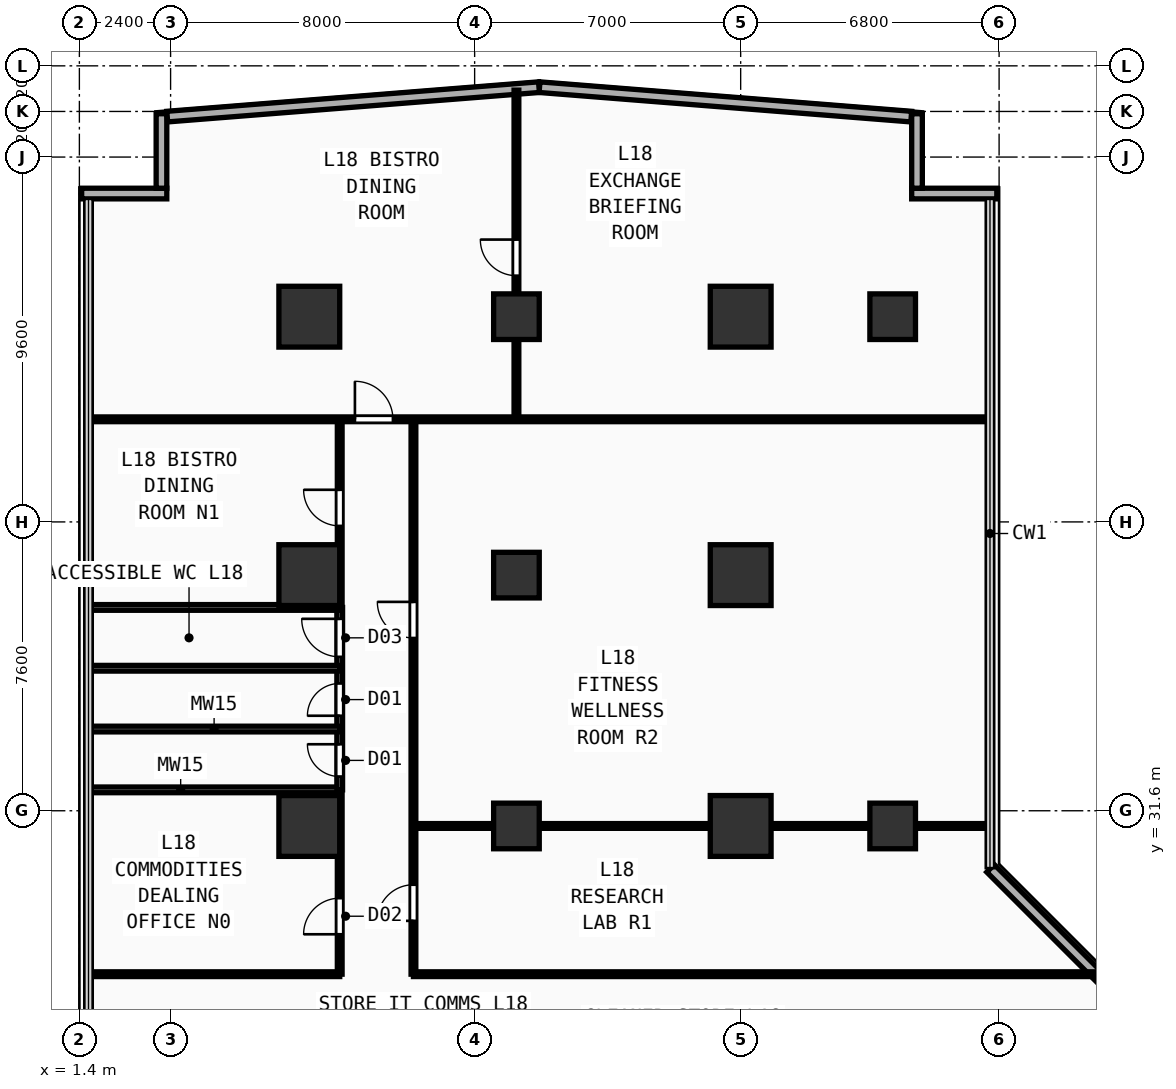
"""IFC4 building model, lengths in metres.
Left out: names, types, materials, properties, quantities, classifications, styles, units other than length and angle.
Written with IfcOpenShell. Run it as: python <this file> out.ifc"""

import sys

from ifc_helpers import new_model, si_unit, direction, frame, frame_2d, origin, origin_2d, place, context, subcontext, project, spatial, rectangle, extrude, element, fill, save


model = new_model("IFC4")
c1 = context("Model", 3, precision=1e-05, world=origin(), true_north=direction((0.0, 1.0)))
c2 = subcontext(c1, "Body", "Model", "MODEL_VIEW")
j1 = project(units=[si_unit("LENGTHUNIT", "METRE"), si_unit("PLANEANGLEUNIT", "RADIAN")], contexts=[c1])
p1 = place(None, origin())
s1 = spatial("IfcSite", under=j1, at=p1, CompositionType="ELEMENT")
p2 = place(p1, origin())
s2 = spatial("IfcBuilding", under=s1, at=p2, CompositionType="ELEMENT")
p3 = place(p2, frame((0.0, 0.0, 71.4)))
s3 = spatial("IfcBuildingStorey", under=s2, at=p3, CompositionType="ELEMENT", Elevation=71.4)
for number, where, z_axis, x_axis in (
    (1, (7.45, 31.2, 0.0), (0.0, 0.0, 1.0), (1.0, 0.0, 0.0)),
    (2, (7.45, 37.8, 0.0), (0.0, 0.0, 1.0), (1.0, 0.0, 0.0)),
    (3, (7.45, 44.6, 0.0), (0.0, 0.0, 1.0), (1.0, 0.0, 0.0)),
    (4, (18.8, 31.2, 0.0), (0.0, 0.0, 1.0), (1.0, 0.0, 0.0)),
    (5, (18.8, 37.8, 0.0), (0.0, 0.0, 1.0), (1.0, 0.0, 0.0)),
    (6, (18.8, 44.6, 0.0), (0.0, 0.0, 1.0), (1.0, 0.0, 0.0)),
):
    element("IfcColumn", number, at=place(p3, frame(where, z_axis=z_axis, x_axis=x_axis)), inside=s3, PredefinedType="COLUMN", context=c2, shape_type="SweptSolid", body=[
        extrude(rectangle(XDim=1.6, YDim=1.6, at=origin_2d()), origin(), (0.0, 0.0, 1.0), 3.54),
    ])
for number, where, z_axis, x_axis in (
    (7, (22.8, 31.2, 0.0), (0.0, 0.0, 1.0), (1.0, 0.0, 0.0)),
    (8, (22.8, 44.6, 0.0), (0.0, 0.0, 1.0), (1.0, 0.0, 0.0)),
    (9, (12.9, 31.2, 0.0), (0.0, 0.0, 1.0), (1.0, 0.0, 0.0)),
    (10, (12.9, 37.8, 0.0), (0.0, 0.0, 1.0), (1.0, 0.0, 0.0)),
    (11, (12.9, 44.6, 0.0), (0.0, 0.0, 1.0), (1.0, 0.0, 0.0)),
):
    element("IfcColumn", number, at=place(p3, frame(where, z_axis=z_axis, x_axis=x_axis)), inside=s3, PredefinedType="COLUMN", context=c2, shape_type="SweptSolid", body=[
        extrude(rectangle(XDim=1.2, YDim=1.2, at=origin_2d()), origin(), (0.0, 0.0, 1.0), 3.54),
    ])
p4 = place(p3, frame((23.3, 47.84, 0.0), z_axis=(0.0, 0.0, 1.0), x_axis=(1.0, 0.0, 0.0)))
e12 = element("IfcWall", 12, at=p4, inside=s3, PredefinedType="SOLIDWALL", context=c2, shape_type="SweptSolid", body=[
    extrude(rectangle(XDim=2.24, YDim=0.28, at=frame_2d((1.12, 0.0))), origin(), (0.0, 0.0, 1.0), 3.54),
])
p5 = place(p3, frame((23.44, 47.98, 0.0), z_axis=(0.0, 0.0, 1.0), x_axis=(0.0, 1.0, 0.0)))
e13 = element("IfcWall", 13, at=p5, inside=s3, PredefinedType="SOLIDWALL", context=c2, shape_type="SweptSolid", body=[
    extrude(rectangle(XDim=1.96, YDim=0.28, at=frame_2d((0.98, 0.0))), origin(), (0.0, 0.0, 1.0), 3.54),
])
p6 = place(p3, frame((1.46, 47.84, 0.0), z_axis=(0.0, 0.0, 1.0), x_axis=(1.0, 0.0, 0.0)))
e14 = element("IfcWall", 14, at=p6, inside=s3, PredefinedType="SOLIDWALL", context=c2, shape_type="SweptSolid", body=[
    extrude(rectangle(XDim=2.24, YDim=0.28, at=frame_2d((1.12, 0.0))), origin(), (0.0, 0.0, 1.0), 3.54),
])
p7 = place(p3, frame((3.56, 47.98, 0.0), z_axis=(0.0, 0.0, 1.0), x_axis=(0.0, 1.0, 0.0)))
e15 = element("IfcWall", 15, at=p7, inside=s3, PredefinedType="SOLIDWALL", context=c2, shape_type="SweptSolid", body=[
    extrude(rectangle(XDim=1.96, YDim=0.28, at=frame_2d((0.98, 0.0))), origin(), (0.0, 0.0, 1.0), 3.54),
])
p8 = place(p3, frame((31.885, 23.575, 0.0), z_axis=(0.0, 0.0, 1.0), x_axis=(-0.707106781187, 0.707106781187, 0.0)))
e16 = element("IfcWall", 16, at=p8, inside=s3, PredefinedType="SOLIDWALL", context=c2, shape_type="SweptSolid", body=[
    extrude(rectangle(XDim=9.207, YDim=0.28, at=frame_2d((4.603, 0.0))), origin(), (0.0, 0.0, 1.0), 3.54),
])
for number, where, z_axis, x_axis in (
    (17, (23.288, 49.864, 0.0), (0.0, 0.0, 1.0), (-0.997, 0.079, 0.0)),
    (18, (13.493, 50.639, 0.0), (0.0, 0.0, 1.0), (-0.997, -0.079, 0.0)),
):
    element("IfcWall", number, at=place(p3, frame(where, z_axis=z_axis, x_axis=x_axis)), inside=s3, PredefinedType="SOLIDWALL", context=c2, shape_type="SweptSolid", body=[
        extrude(rectangle(XDim=9.812, YDim=0.28, at=frame_2d((4.906, 0.0))), origin(), (0.0, 0.0, 1.0), 3.54),
    ])
p9 = place(p3, frame((8.25, 27.3, 0.0), z_axis=(0.0, 0.0, 1.0), x_axis=(0.0, 1.0, 0.0)))
e19 = element("IfcWall", 19, at=p9, inside=s3, PredefinedType="PARTITIONING", context=c2, shape_type="SweptSolid", body=[
    extrude(rectangle(XDim=4.85, YDim=0.125, at=frame_2d((2.425, 0.0))), origin(), (0.0, 0.0, 1.0), 3.54),
])
p10 = place(p9, frame((1.05, 0.0, 0.0)))
e20 = element("IfcOpeningElement", 20, at=p10, cuts=e19, PredefinedType="OPENING", context=c2, shape_type="SweptSolid", body=[
    extrude(rectangle(XDim=0.95, YDim=2.15, at=frame_2d((0.475, 1.075))), frame((0.0, 0.073, 0.0), z_axis=(0.0, -1.0, 0.0), x_axis=(1.0, 0.0, 0.0)), (0.0, 0.0, 1.0), 0.145),
])
p11 = place(p3, frame((1.64, 27.3, 0.0), z_axis=(0.0, 0.0, 1.0), x_axis=(1.0, 0.0, 0.0)))
e21 = element("IfcWall", 21, at=p11, inside=s3, PredefinedType="PARTITIONING", context=c2, shape_type="SweptSolid", body=[
    extrude(rectangle(XDim=6.61, YDim=0.125, at=frame_2d((3.305, 0.0))), origin(), (0.0, 0.0, 1.0), 3.54),
])
p12 = place(p3, frame((1.64, 32.15, 0.0), z_axis=(0.0, 0.0, 1.0), x_axis=(1.0, 0.0, 0.0)))
e22 = element("IfcWall", 22, at=p12, inside=s3, PredefinedType="PLUMBINGWALL", context=c2, shape_type="SweptSolid", body=[
    extrude(rectangle(XDim=6.61, YDim=0.15, at=frame_2d((3.305, 0.0))), origin(), (0.0, 0.0, 1.0), 3.54),
])
p13 = place(p3, frame((8.25, 32.15, 0.0), z_axis=(0.0, 0.0, 1.0), x_axis=(0.0, 1.0, 0.0)))
e23 = element("IfcWall", 23, at=p13, inside=s3, PredefinedType="PLUMBINGWALL", context=c2, shape_type="SweptSolid", body=[
    extrude(rectangle(XDim=4.8, YDim=0.15, at=frame_2d((2.4, 0.0))), origin(), (0.0, 0.0, 1.0), 3.54),
])
p14 = place(p13, frame((0.35, 0.0, 0.0)))
e24 = element("IfcOpeningElement", 24, at=p14, cuts=e23, PredefinedType="OPENING", context=c2, shape_type="SweptSolid", body=[
    extrude(rectangle(XDim=0.85, YDim=2.15, at=frame_2d((0.425, 1.075))), frame((0.0, 0.085, 0.0), z_axis=(0.0, -1.0, 0.0), x_axis=(1.0, 0.0, 0.0)), (0.0, 0.0, 1.0), 0.17),
])
p15 = place(p13, frame((1.95, 0.0, 0.0)))
e25 = element("IfcOpeningElement", 25, at=p15, cuts=e23, PredefinedType="OPENING", context=c2, shape_type="SweptSolid", body=[
    extrude(rectangle(XDim=0.85, YDim=2.15, at=frame_2d((0.425, 1.075))), frame((0.0, 0.085, 0.0), z_axis=(0.0, -1.0, 0.0), x_axis=(1.0, 0.0, 0.0)), (0.0, 0.0, 1.0), 0.17),
])
p16 = place(p13, frame((3.5, 0.0, 0.0)))
e26 = element("IfcOpeningElement", 26, at=p16, cuts=e23, PredefinedType="OPENING", context=c2, shape_type="SweptSolid", body=[
    extrude(rectangle(XDim=1.0, YDim=2.2, at=frame_2d((0.5, 1.1))), frame((0.0, 0.085, 0.0), z_axis=(0.0, -1.0, 0.0), x_axis=(1.0, 0.0, 0.0)), (0.0, 0.0, 1.0), 0.17),
])
for number, where, z_axis, x_axis in (
    (27, (1.64, 33.75, 0.0), (0.0, 0.0, 1.0), (1.0, 0.0, 0.0)),
    (28, (1.64, 35.35, 0.0), (0.0, 0.0, 1.0), (1.0, 0.0, 0.0)),
):
    element("IfcWall", number, at=place(p3, frame(where, z_axis=z_axis, x_axis=x_axis)), inside=s3, PredefinedType="PLUMBINGWALL", context=c2, shape_type="SweptSolid", body=[
        extrude(rectangle(XDim=6.61, YDim=0.15, at=frame_2d((3.305, 0.0))), origin(), (0.0, 0.0, 1.0), 3.04),
    ])
p17 = place(p3, frame((1.64, 36.95, 0.0), z_axis=(0.0, 0.0, 1.0), x_axis=(1.0, 0.0, 0.0)))
e29 = element("IfcWall", 29, at=p17, inside=s3, PredefinedType="PLUMBINGWALL", context=c2, shape_type="SweptSolid", body=[
    extrude(rectangle(XDim=6.61, YDim=0.15, at=frame_2d((3.305, 0.0))), origin(), (0.0, 0.0, 1.0), 3.54),
])
p18 = place(p3, frame((8.25, 36.95, 0.0), z_axis=(0.0, 0.0, 1.0), x_axis=(0.0, 1.0, 0.0)))
e30 = element("IfcWall", 30, at=p18, inside=s3, PredefinedType="PARTITIONING", context=c2, shape_type="SweptSolid", body=[
    extrude(rectangle(XDim=4.95, YDim=0.125, at=frame_2d((2.475, 0.0))), origin(), (0.0, 0.0, 1.0), 3.54),
])
p19 = place(p18, frame((2.146, 0.0, 0.0)))
e31 = element("IfcOpeningElement", 31, at=p19, cuts=e30, PredefinedType="OPENING", context=c2, shape_type="SweptSolid", body=[
    extrude(rectangle(XDim=0.95, YDim=2.15, at=frame_2d((0.475, 1.075))), frame((0.0, 0.073, 0.0), z_axis=(0.0, -1.0, 0.0), x_axis=(1.0, 0.0, 0.0)), (0.0, 0.0, 1.0), 0.145),
])
p20 = place(p3, frame((1.64, 41.9, 0.0), z_axis=(0.0, 0.0, 1.0), x_axis=(1.0, 0.0, 0.0)))
e32 = element("IfcWall", 32, at=p20, inside=s3, PredefinedType="PARTITIONING", context=c2, shape_type="SweptSolid", body=[
    extrude(rectangle(XDim=23.72, YDim=0.125, at=frame_2d((11.86, 0.0))), origin(), (0.0, 0.0, 1.0), 3.54),
])
p21 = place(p20, frame((7.01, 0.0, 0.0)))
e33 = element("IfcOpeningElement", 33, at=p21, cuts=e32, PredefinedType="OPENING", context=c2, shape_type="SweptSolid", body=[
    extrude(rectangle(XDim=1.0, YDim=2.2, at=frame_2d((0.5, 1.1))), frame((0.0, 0.073, 0.0), z_axis=(0.0, -1.0, 0.0), x_axis=(1.0, 0.0, 0.0)), (0.0, 0.0, 1.0), 0.145),
])
p22 = place(p3, frame((12.9, 41.9, 0.0), z_axis=(0.0, 0.0, 1.0), x_axis=(0.0, 1.0, 0.0)))
e34 = element("IfcWall", 34, at=p22, inside=s3, PredefinedType="PARTITIONING", context=c2, shape_type="SweptSolid", body=[
    extrude(rectangle(XDim=8.66, YDim=0.125, at=frame_2d((4.33, 0.0))), origin(), (0.0, 0.0, 1.0), 2.94),
])
p23 = place(p22, frame((3.779, 0.0, 0.0)))
e35 = element("IfcOpeningElement", 35, at=p23, cuts=e34, PredefinedType="OPENING", context=c2, shape_type="SweptSolid", body=[
    extrude(rectangle(XDim=0.95, YDim=2.15, at=frame_2d((0.475, 1.075))), frame((0.0, 0.073, 0.0), z_axis=(0.0, -1.0, 0.0), x_axis=(1.0, 0.0, 0.0)), (0.0, 0.0, 1.0), 0.145),
])
p24 = place(p3, frame((10.19, 27.3, 0.0), z_axis=(0.0, 0.0, 1.0), x_axis=(1.0, 0.0, 0.0)))
e36 = element("IfcWall", 36, at=p24, inside=s3, PredefinedType="PARTITIONING", context=c2, shape_type="SweptSolid", body=[
    extrude(rectangle(XDim=18.07, YDim=0.125, at=frame_2d((9.035, 0.0))), origin(), (0.0, 0.0, 1.0), 3.54),
])
p25 = place(p3, frame((10.19, 27.3, 0.0), z_axis=(0.0, 0.0, 1.0), x_axis=(0.0, 1.0, 0.0)))
e37 = element("IfcWall", 37, at=p25, inside=s3, PredefinedType="PARTITIONING", context=c2, shape_type="SweptSolid", body=[
    extrude(rectangle(XDim=14.6, YDim=0.125, at=frame_2d((7.3, 0.0))), origin(), (0.0, 0.0, 1.0), 3.54),
])
p26 = place(p25, frame((1.403, 0.0, 0.0)))
e38 = element("IfcOpeningElement", 38, at=p26, cuts=e37, PredefinedType="OPENING", context=c2, shape_type="SweptSolid", body=[
    extrude(rectangle(XDim=0.95, YDim=2.15, at=frame_2d((0.475, 1.075))), frame((0.0, 0.073, 0.0), z_axis=(0.0, -1.0, 0.0), x_axis=(1.0, 0.0, 0.0)), (0.0, 0.0, 1.0), 0.145),
])
p27 = place(p25, frame((8.846, 0.0, 0.0)))
e39 = element("IfcOpeningElement", 39, at=p27, cuts=e37, PredefinedType="OPENING", context=c2, shape_type="SweptSolid", body=[
    extrude(rectangle(XDim=0.95, YDim=2.15, at=frame_2d((0.475, 1.075))), frame((0.0, 0.073, 0.0), z_axis=(0.0, -1.0, 0.0), x_axis=(1.0, 0.0, 0.0)), (0.0, 0.0, 1.0), 0.145),
])
p28 = place(p3, frame((10.19, 31.2, 0.0), z_axis=(0.0, 0.0, 1.0), x_axis=(1.0, 0.0, 0.0)))
e40 = element("IfcWall", 40, at=p28, inside=s3, PredefinedType="PARTITIONING", context=c2, shape_type="SweptSolid", body=[
    extrude(rectangle(XDim=15.17, YDim=0.125, at=frame_2d((7.585, 0.0))), origin(), (0.0, 0.0, 1.0), 2.94),
])
p29 = place(p10, origin())
e41 = element("IfcDoor", 41, at=p29, inside=s3, OperationType="SINGLE_SWING_LEFT", PredefinedType="DOOR", context=c2, shape_type="SweptSolid", body=[
    extrude(rectangle(XDim=0.95, YDim=2.15, at=frame_2d((0.475, 1.075))), frame((0.0, 0.025, 0.0), z_axis=(0.0, -1.0, 0.0), x_axis=(1.0, 0.0, 0.0)), (0.0, 0.0, 1.0), 0.05),
])
fill(e20, e41)
p30 = place(p14, origin())
e42 = element("IfcDoor", 42, at=p30, inside=s3, OperationType="SINGLE_SWING_RIGHT", PredefinedType="DOOR", context=c2, shape_type="SweptSolid", body=[
    extrude(rectangle(XDim=0.85, YDim=2.15, at=frame_2d((0.425, 1.075))), frame((0.0, 0.025, 0.0), z_axis=(0.0, -1.0, 0.0), x_axis=(1.0, 0.0, 0.0)), (0.0, 0.0, 1.0), 0.05),
])
fill(e24, e42)
p31 = place(p15, origin())
e43 = element("IfcDoor", 43, at=p31, inside=s3, OperationType="SINGLE_SWING_LEFT", PredefinedType="DOOR", context=c2, shape_type="SweptSolid", body=[
    extrude(rectangle(XDim=0.85, YDim=2.15, at=frame_2d((0.425, 1.075))), frame((0.0, 0.025, 0.0), z_axis=(0.0, -1.0, 0.0), x_axis=(1.0, 0.0, 0.0)), (0.0, 0.0, 1.0), 0.05),
])
fill(e25, e43)
p32 = place(p16, origin())
e44 = element("IfcDoor", 44, at=p32, inside=s3, OperationType="SINGLE_SWING_RIGHT", PredefinedType="DOOR", context=c2, shape_type="SweptSolid", body=[
    extrude(rectangle(XDim=1.0, YDim=2.2, at=frame_2d((0.5, 1.1))), frame((0.0, 0.025, 0.0), z_axis=(0.0, -1.0, 0.0), x_axis=(1.0, 0.0, 0.0)), (0.0, 0.0, 1.0), 0.05),
])
fill(e26, e44)
p33 = place(p19, origin())
e45 = element("IfcDoor", 45, at=p33, inside=s3, OperationType="SINGLE_SWING_RIGHT", PredefinedType="DOOR", context=c2, shape_type="SweptSolid", body=[
    extrude(rectangle(XDim=0.95, YDim=2.15, at=frame_2d((0.475, 1.075))), frame((0.0, 0.025, 0.0), z_axis=(0.0, -1.0, 0.0), x_axis=(1.0, 0.0, 0.0)), (0.0, 0.0, 1.0), 0.05),
])
fill(e31, e45)
p34 = place(p21, origin())
e46 = element("IfcDoor", 46, at=p34, inside=s3, OperationType="SINGLE_SWING_LEFT", PredefinedType="DOOR", context=c2, shape_type="SweptSolid", body=[
    extrude(rectangle(XDim=1.0, YDim=2.2, at=frame_2d((0.5, 1.1))), frame((0.0, 0.025, 0.0), z_axis=(0.0, -1.0, 0.0), x_axis=(1.0, 0.0, 0.0)), (0.0, 0.0, 1.0), 0.05),
])
fill(e33, e46)
p35 = place(p23, origin())
e47 = element("IfcDoor", 47, at=p35, inside=s3, OperationType="SINGLE_SWING_RIGHT", PredefinedType="DOOR", context=c2, shape_type="SweptSolid", body=[
    extrude(rectangle(XDim=0.95, YDim=2.15, at=frame_2d((0.475, 1.075))), frame((0.0, 0.025, 0.0), z_axis=(0.0, -1.0, 0.0), x_axis=(1.0, 0.0, 0.0)), (0.0, 0.0, 1.0), 0.05),
])
fill(e35, e47)
p36 = place(p26, origin())
e48 = element("IfcDoor", 48, at=p36, inside=s3, OperationType="SINGLE_SWING_LEFT", PredefinedType="DOOR", context=c2, shape_type="SweptSolid", body=[
    extrude(rectangle(XDim=0.95, YDim=2.15, at=frame_2d((0.475, 1.075))), frame((0.0, 0.025, 0.0), z_axis=(0.0, -1.0, 0.0), x_axis=(1.0, 0.0, 0.0)), (0.0, 0.0, 1.0), 0.05),
])
fill(e38, e48)
p37 = place(p27, origin())
e49 = element("IfcDoor", 49, at=p37, inside=s3, OperationType="SINGLE_SWING_RIGHT", PredefinedType="DOOR", context=c2, shape_type="SweptSolid", body=[
    extrude(rectangle(XDim=0.95, YDim=2.15, at=frame_2d((0.475, 1.075))), frame((0.0, 0.025, 0.0), z_axis=(0.0, -1.0, 0.0), x_axis=(1.0, 0.0, 0.0)), (0.0, 0.0, 1.0), 0.05),
])
fill(e39, e49)
save(model, sys.argv[1])
